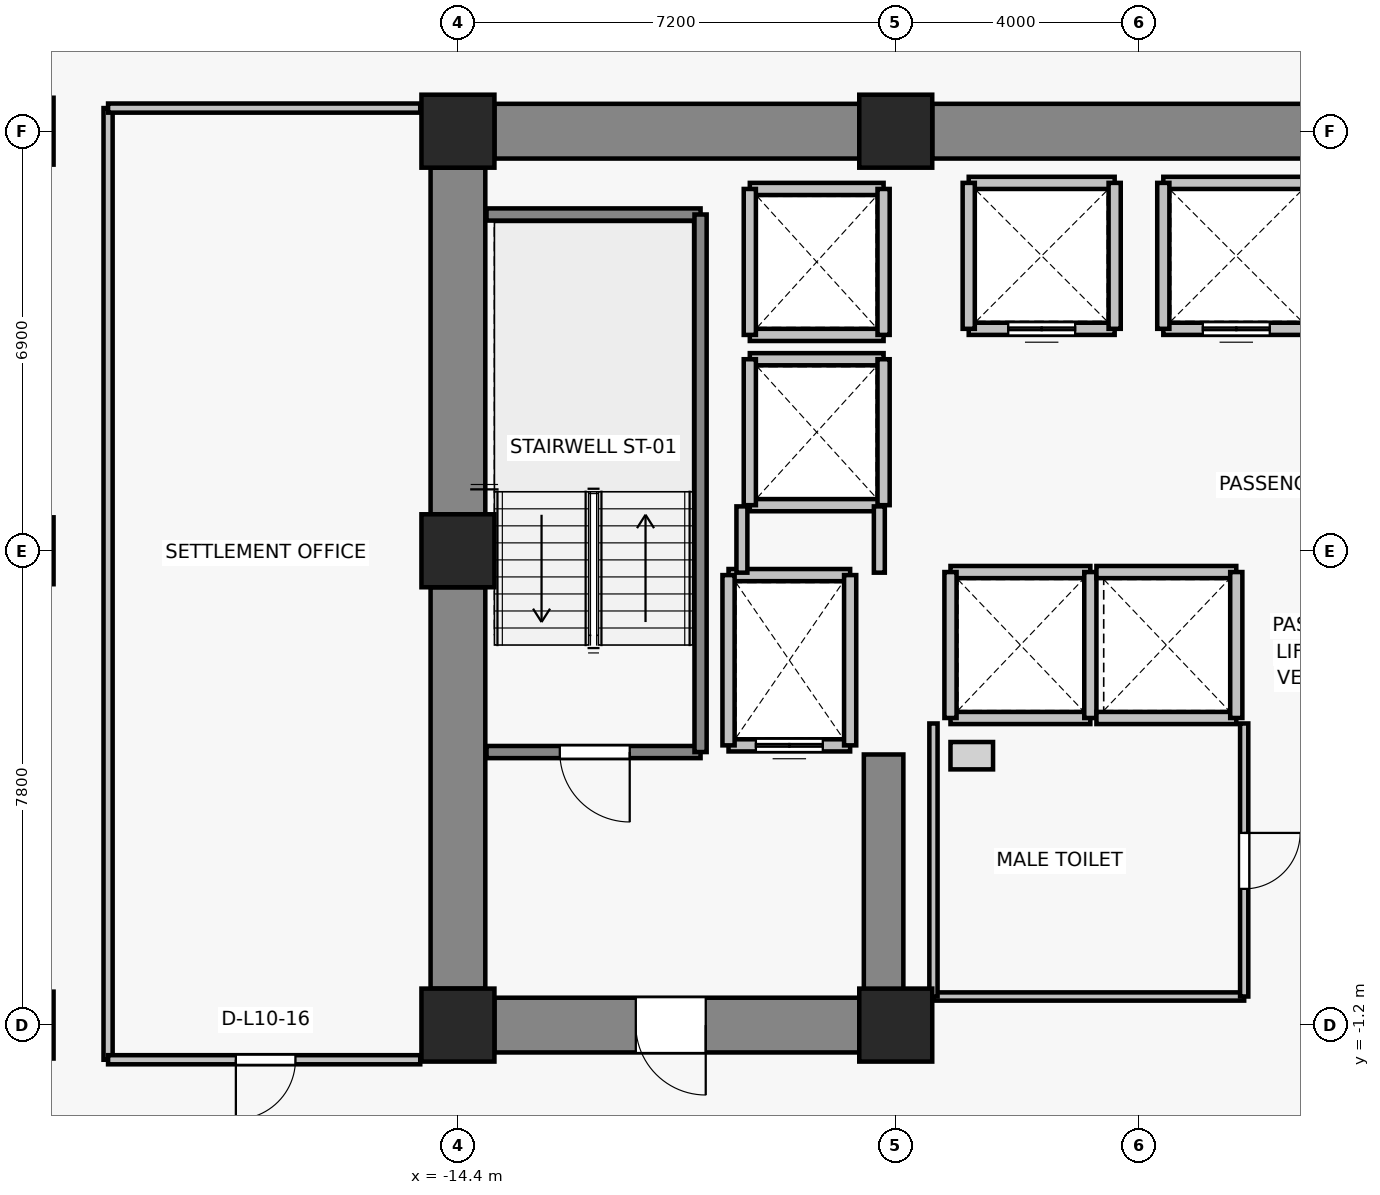
"""IFC4 building model, lengths in metres.
Left out: names, types, materials, properties, quantities, classifications, styles, units other than length and angle.
Written with IfcOpenShell. Run it as: python <this file> out.ifc"""

import sys

from ifc_helpers import new_model, si_unit, direction, frame, frame_2d, origin, origin_2d, place, context, subcontext, project, spatial, rectangle, extrude, source, transform, mapped, element, fill, save


model = new_model("IFC4")
c1 = context("Model", 3, precision=1e-05, world=origin(), true_north=direction((0.0, 1.0)))
c2 = subcontext(c1, "Body", "Model", "MODEL_VIEW")
j1 = project(units=[si_unit("LENGTHUNIT", "METRE"), si_unit("PLANEANGLEUNIT", "RADIAN")], contexts=[c1])
p1 = place(None, origin())
s1 = spatial("IfcSite", under=j1, at=p1, CompositionType="ELEMENT")
p2 = place(p1, origin())
s2 = spatial("IfcBuilding", under=s1, at=p2, CompositionType="ELEMENT")
p3 = place(p2, frame((0.0, 0.0, 40.6)))
s3 = spatial("IfcBuildingStorey", under=s2, at=p3, CompositionType="ELEMENT", Elevation=40.6)
for number, where, z_axis, x_axis in (
    (1, (-14.4, -1.2, 0.0), (0.0, 0.0, 1.0), (1.0, 0.0, 0.0)),
    (2, (-7.2, -1.2, 0.0), (0.0, 0.0, 1.0), (1.0, 0.0, 0.0)),
    (3, (-14.4, 6.6, 0.0), (0.0, 0.0, 1.0), (1.0, 0.0, 0.0)),
    (4, (-14.4, 13.5, 0.0), (0.0, 0.0, 1.0), (1.0, 0.0, 0.0)),
    (5, (-7.2, 13.5, 0.0), (0.0, 0.0, 1.0), (1.0, 0.0, 0.0)),
):
    element("IfcColumn", number, at=place(p3, frame(where, z_axis=z_axis, x_axis=x_axis)), inside=s3, PredefinedType="COLUMN", context=c2, shape_type="SweptSolid", body=[
        extrude(rectangle(XDim=1.2, YDim=1.2, at=origin_2d()), origin(), (0.0, 0.0, 1.0), 3.3),
    ])
for number, where, z_axis, x_axis in (
    (6, (-21.6, -1.2, 0.0), (0.0, 0.0, 1.0), (1.0, 0.0, 0.0)),
    (7, (-21.6, 6.6, 0.0), (0.0, 0.0, 1.0), (1.0, 0.0, 0.0)),
    (8, (-21.6, 13.5, 0.0), (0.0, 0.0, 1.0), (1.0, 0.0, 0.0)),
):
    element("IfcColumn", number, at=place(p3, frame(where, z_axis=z_axis, x_axis=x_axis)), inside=s3, PredefinedType="COLUMN", context=c2, shape_type="SweptSolid", body=[
        extrude(rectangle(XDim=1.1, YDim=1.1, at=origin_2d()), origin(), (0.0, 0.0, 1.0), 3.3),
    ])
p4 = place(p3, frame((-13.8, 13.5, 0.0), z_axis=(0.0, 0.0, 1.0), x_axis=(1.0, 0.0, 0.0)))
e9 = element("IfcWall", 9, at=p4, inside=s3, PredefinedType="SHEAR", context=c2, shape_type="SweptSolid", body=[
    extrude(rectangle(XDim=6.0, YDim=0.9, at=frame_2d((3.0, 0.0))), origin(), (0.0, 0.0, 1.0), 3.075),
])
p5 = place(p3, frame((-6.6, 13.5, 0.0), z_axis=(0.0, 0.0, 1.0), x_axis=(1.0, 0.0, 0.0)))
e10 = element("IfcWall", 10, at=p5, inside=s3, PredefinedType="SHEAR", context=c2, shape_type="SweptSolid", body=[
    extrude(rectangle(XDim=13.2, YDim=0.9, at=frame_2d((6.6, 0.0))), origin(), (0.0, 0.0, 1.0), 3.075),
])
p6 = place(p3, frame((-14.4, -0.6, 0.0), z_axis=(0.0, 0.0, 1.0), x_axis=(0.0, 1.0, 0.0)))
e11 = element("IfcWall", 11, at=p6, inside=s3, PredefinedType="SHEAR", context=c2, shape_type="SweptSolid", body=[
    extrude(rectangle(XDim=6.6, YDim=0.9, at=frame_2d((3.3, 0.0))), origin(), (0.0, 0.0, 1.0), 3.075),
])
p7 = place(p3, frame((-14.4, 7.2, 0.0), z_axis=(0.0, 0.0, 1.0), x_axis=(0.0, 1.0, 0.0)))
e12 = element("IfcWall", 12, at=p7, inside=s3, PredefinedType="SHEAR", context=c2, shape_type="SweptSolid", body=[
    extrude(rectangle(XDim=5.7, YDim=0.9, at=frame_2d((2.85, 0.0))), origin(), (0.0, 0.0, 1.0), 3.075),
])
p8 = place(p3, frame((-7.8, -1.2, 0.0), z_axis=(0.0, 0.0, 1.0), x_axis=(-1.0, 0.0, 0.0)))
e13 = element("IfcWall", 13, at=p8, inside=s3, PredefinedType="SHEAR", context=c2, shape_type="SweptSolid", body=[
    extrude(rectangle(XDim=6.0, YDim=0.9, at=frame_2d((3.0, 0.0))), origin(), (0.0, 0.0, 1.0), 3.075),
])
p9 = place(p8, frame((2.525, 0.0, 0.0)))
e14 = element("IfcOpeningElement", 14, at=p9, cuts=e13, PredefinedType="OPENING", context=c2, shape_type="SweptSolid", body=[
    extrude(rectangle(XDim=1.15, YDim=2.15, at=frame_2d((0.575, 1.075))), frame((0.0, 0.46, 0.0), z_axis=(0.0, -1.0, 0.0), x_axis=(1.0, 0.0, 0.0)), (0.0, 0.0, 1.0), 0.92),
])
p10 = place(p3, frame((-7.4, -0.75, 0.0), z_axis=(0.0, 0.0, 1.0), x_axis=(0.0, 1.0, 0.0)))
e15 = element("IfcWall", 15, at=p10, inside=s3, PredefinedType="SHEAR", context=c2, shape_type="SweptSolid", body=[
    extrude(rectangle(XDim=4.0, YDim=0.65, at=frame_2d((2.0, 0.0))), origin(), (0.0, 0.0, 1.0), 3.075),
])
p11 = place(p3, frame((-7.95, 3.4, 0.0), z_axis=(0.0, 0.0, 1.0), x_axis=(-1.0, 0.0, 0.0)))
e16 = element("IfcWall", 16, at=p11, inside=s3, PredefinedType="SOLIDWALL", context=c2, shape_type="SweptSolid", body=[
    extrude(rectangle(XDim=2.0, YDim=0.2, at=frame_2d((1.0, 0.0))), origin(), (0.0, 0.0, 1.0), 3.075),
])
p12 = place(p11, frame((0.45, 0.0, 0.0)))
e17 = element("IfcOpeningElement", 17, at=p12, cuts=e16, PredefinedType="OPENING", context=c2, shape_type="SweptSolid", body=[
    extrude(rectangle(XDim=1.1, YDim=2.2, at=frame_2d((0.55, 1.1))), frame((0.0, 0.11, 0.0), z_axis=(0.0, -1.0, 0.0), x_axis=(1.0, 0.0, 0.0)), (0.0, 0.0, 1.0), 0.22),
])
p13 = place(p3, frame((-9.95, 6.2, 0.0), z_axis=(0.0, 0.0, 1.0), x_axis=(1.0, 0.0, 0.0)))
e18 = element("IfcWall", 18, at=p13, inside=s3, PredefinedType="SOLIDWALL", context=c2, shape_type="SweptSolid", body=[
    extrude(rectangle(XDim=2.0, YDim=0.2, at=frame_2d((1.0, 0.0))), origin(), (0.0, 0.0, 1.0), 3.075),
])
for number, where, z_axis, x_axis in (
    (19, (-9.95, 3.4, 0.0), (0.0, 0.0, 1.0), (0.0, 1.0, 0.0)),
    (20, (-7.95, 6.2, 0.0), (0.0, 0.0, 1.0), (0.0, -1.0, 0.0)),
):
    element("IfcWall", number, at=place(p3, frame(where, z_axis=z_axis, x_axis=x_axis)), inside=s3, PredefinedType="SOLIDWALL", context=c2, shape_type="SweptSolid", body=[
        extrude(rectangle(XDim=2.8, YDim=0.2, at=frame_2d((1.4, 0.0))), origin(), (0.0, 0.0, 1.0), 3.075),
    ])
p14 = place(p3, frame((-3.6, 10.25, 0.0), z_axis=(0.0, 0.0, 1.0), x_axis=(-1.0, 0.0, 0.0)))
e21 = element("IfcWall", 21, at=p14, inside=s3, PredefinedType="SOLIDWALL", context=c2, shape_type="SweptSolid", body=[
    extrude(rectangle(XDim=2.4, YDim=0.2, at=frame_2d((1.2, 0.0))), origin(), (0.0, 0.0, 1.0), 3.075),
])
p15 = place(p14, frame((0.65, 0.0, 0.0)))
e22 = element("IfcOpeningElement", 22, at=p15, cuts=e21, PredefinedType="OPENING", context=c2, shape_type="SweptSolid", body=[
    extrude(rectangle(XDim=1.1, YDim=2.2, at=frame_2d((0.55, 1.1))), frame((0.0, 0.11, 0.0), z_axis=(0.0, -1.0, 0.0), x_axis=(1.0, 0.0, 0.0)), (0.0, 0.0, 1.0), 0.22),
])
for number, where, z_axis, x_axis in (
    (23, (-6.0, 12.65, 0.0), (0.0, 0.0, 1.0), (1.0, 0.0, 0.0)),
    (24, (-6.0, 10.25, 0.0), (0.0, 0.0, 1.0), (0.0, 1.0, 0.0)),
    (25, (-3.6, 12.65, 0.0), (0.0, 0.0, 1.0), (0.0, -1.0, 0.0)),
):
    element("IfcWall", number, at=place(p3, frame(where, z_axis=z_axis, x_axis=x_axis)), inside=s3, PredefinedType="SOLIDWALL", context=c2, shape_type="SweptSolid", body=[
        extrude(rectangle(XDim=2.4, YDim=0.2, at=frame_2d((1.2, 0.0))), origin(), (0.0, 0.0, 1.0), 3.075),
    ])
p16 = place(p3, frame((-0.4, 10.25, 0.0), z_axis=(0.0, 0.0, 1.0), x_axis=(-1.0, 0.0, 0.0)))
e26 = element("IfcWall", 26, at=p16, inside=s3, PredefinedType="SOLIDWALL", context=c2, shape_type="SweptSolid", body=[
    extrude(rectangle(XDim=2.4, YDim=0.2, at=frame_2d((1.2, 0.0))), origin(), (0.0, 0.0, 1.0), 3.075),
])
p17 = place(p16, frame((0.65, 0.0, 0.0)))
e27 = element("IfcOpeningElement", 27, at=p17, cuts=e26, PredefinedType="OPENING", context=c2, shape_type="SweptSolid", body=[
    extrude(rectangle(XDim=1.1, YDim=2.2, at=frame_2d((0.55, 1.1))), frame((0.0, 0.11, 0.0), z_axis=(0.0, -1.0, 0.0), x_axis=(1.0, 0.0, 0.0)), (0.0, 0.0, 1.0), 0.22),
])
p18 = place(p3, frame((-2.8, 12.65, 0.0), z_axis=(0.0, 0.0, 1.0), x_axis=(1.0, 0.0, 0.0)))
e28 = element("IfcWall", 28, at=p18, inside=s3, PredefinedType="SOLIDWALL", context=c2, shape_type="SweptSolid", body=[
    extrude(rectangle(XDim=2.4, YDim=0.2, at=frame_2d((1.2, 0.0))), origin(), (0.0, 0.0, 1.0), 3.075),
])
p19 = place(p3, frame((-2.8, 10.25, 0.0), z_axis=(0.0, 0.0, 1.0), x_axis=(0.0, 1.0, 0.0)))
e29 = element("IfcWall", 29, at=p19, inside=s3, PredefinedType="SOLIDWALL", context=c2, shape_type="SweptSolid", body=[
    extrude(rectangle(XDim=2.4, YDim=0.2, at=frame_2d((1.2, 0.0))), origin(), (0.0, 0.0, 1.0), 3.075),
])
for number, where, z_axis, x_axis in (
    (30, (-4.0, 3.85, 0.0), (0.0, 0.0, 1.0), (-1.0, 0.0, 0.0)),
    (31, (-6.3, 6.25, 0.0), (0.0, 0.0, 1.0), (1.0, 0.0, 0.0)),
):
    element("IfcWall", number, at=place(p3, frame(where, z_axis=z_axis, x_axis=x_axis)), inside=s3, PredefinedType="SOLIDWALL", context=c2, shape_type="SweptSolid", body=[
        extrude(rectangle(XDim=2.3, YDim=0.2, at=frame_2d((1.15, 0.0))), origin(), (0.0, 0.0, 1.0), 3.075),
    ])
for number, where, z_axis, x_axis in (
    (32, (-6.3, 3.85, 0.0), (0.0, 0.0, 1.0), (0.0, 1.0, 0.0)),
    (33, (-4.0, 6.25, 0.0), (0.0, 0.0, 1.0), (0.0, -1.0, 0.0)),
):
    element("IfcWall", number, at=place(p3, frame(where, z_axis=z_axis, x_axis=x_axis)), inside=s3, PredefinedType="SOLIDWALL", context=c2, shape_type="SweptSolid", body=[
        extrude(rectangle(XDim=2.4, YDim=0.2, at=frame_2d((1.2, 0.0))), origin(), (0.0, 0.0, 1.0), 3.075),
    ])
for number, where, z_axis, x_axis in (
    (34, (-1.6, 3.85, 0.0), (0.0, 0.0, 1.0), (-1.0, 0.0, 0.0)),
    (35, (-3.9, 6.25, 0.0), (0.0, 0.0, 1.0), (1.0, 0.0, 0.0)),
):
    element("IfcWall", number, at=place(p3, frame(where, z_axis=z_axis, x_axis=x_axis)), inside=s3, PredefinedType="SOLIDWALL", context=c2, shape_type="SweptSolid", body=[
        extrude(rectangle(XDim=2.3, YDim=0.2, at=frame_2d((1.15, 0.0))), origin(), (0.0, 0.0, 1.0), 3.075),
    ])
p20 = place(p3, frame((-1.6, 6.25, 0.0), z_axis=(0.0, 0.0, 1.0), x_axis=(0.0, -1.0, 0.0)))
e36 = element("IfcWall", 36, at=p20, inside=s3, PredefinedType="SOLIDWALL", context=c2, shape_type="SweptSolid", body=[
    extrude(rectangle(XDim=2.4, YDim=0.2, at=frame_2d((1.2, 0.0))), origin(), (0.0, 0.0, 1.0), 3.075),
])
for number, where, z_axis, x_axis in (
    (37, (-7.4, 7.35, 0.0), (0.0, 0.0, 1.0), (-1.0, 0.0, 0.0)),
    (38, (-9.6, 9.75, 0.0), (0.0, 0.0, 1.0), (1.0, 0.0, 0.0)),
):
    element("IfcWall", number, at=place(p3, frame(where, z_axis=z_axis, x_axis=x_axis)), inside=s3, PredefinedType="SOLIDWALL", context=c2, shape_type="SweptSolid", body=[
        extrude(rectangle(XDim=2.2, YDim=0.2, at=frame_2d((1.1, 0.0))), origin(), (0.0, 0.0, 1.0), 2.465),
    ])
p21 = place(p3, frame((-9.6, 7.35, 0.0), z_axis=(0.0, 0.0, 1.0), x_axis=(0.0, 1.0, 0.0)))
e39 = element("IfcWall", 39, at=p21, inside=s3, PredefinedType="SOLIDWALL", context=c2, shape_type="SweptSolid", body=[
    extrude(rectangle(XDim=2.4, YDim=0.2, at=frame_2d((1.2, 0.0))), origin(), (0.0, 0.0, 1.0), 3.075),
])
p22 = place(p3, frame((-7.4, 9.75, 0.0), z_axis=(0.0, 0.0, 1.0), x_axis=(0.0, -1.0, 0.0)))
e40 = element("IfcWall", 40, at=p22, inside=s3, PredefinedType="SOLIDWALL", context=c2, shape_type="SweptSolid", body=[
    extrude(rectangle(XDim=2.4, YDim=0.2, at=frame_2d((1.2, 0.0))), origin(), (0.0, 0.0, 1.0), 2.465),
])
for number, where, z_axis, x_axis in (
    (41, (-7.4, 10.15, 0.0), (0.0, 0.0, 1.0), (-1.0, 0.0, 0.0)),
    (42, (-9.6, 12.55, 0.0), (0.0, 0.0, 1.0), (1.0, 0.0, 0.0)),
):
    element("IfcWall", number, at=place(p3, frame(where, z_axis=z_axis, x_axis=x_axis)), inside=s3, PredefinedType="SOLIDWALL", context=c2, shape_type="SweptSolid", body=[
        extrude(rectangle(XDim=2.2, YDim=0.2, at=frame_2d((1.1, 0.0))), origin(), (0.0, 0.0, 1.0), 2.465),
    ])
p23 = place(p3, frame((-9.6, 10.15, 0.0), z_axis=(0.0, 0.0, 1.0), x_axis=(0.0, 1.0, 0.0)))
e43 = element("IfcWall", 43, at=p23, inside=s3, PredefinedType="SOLIDWALL", context=c2, shape_type="SweptSolid", body=[
    extrude(rectangle(XDim=2.4, YDim=0.2, at=frame_2d((1.2, 0.0))), origin(), (0.0, 0.0, 1.0), 3.075),
])
p24 = place(p3, frame((-7.4, 12.55, 0.0), z_axis=(0.0, 0.0, 1.0), x_axis=(0.0, -1.0, 0.0)))
e44 = element("IfcWall", 44, at=p24, inside=s3, PredefinedType="SOLIDWALL", context=c2, shape_type="SweptSolid", body=[
    extrude(rectangle(XDim=2.4, YDim=0.2, at=frame_2d((1.2, 0.0))), origin(), (0.0, 0.0, 1.0), 2.465),
])
p25 = place(p3, frame((-10.41, 3.29, 0.0), z_axis=(0.0, 0.0, 1.0), x_axis=(-1.0, 0.0, 0.0)))
e45 = element("IfcWall", 45, at=p25, inside=s3, PredefinedType="SOLIDWALL", context=c2, shape_type="SweptSolid", body=[
    extrude(rectangle(XDim=3.52, YDim=0.2, at=frame_2d((1.76, 0.0))), origin(), (0.0, 0.0, 1.0), 3.075),
])
p26 = place(p25, frame((1.165, 0.0, 0.0)))
e46 = element("IfcOpeningElement", 46, at=p26, cuts=e45, PredefinedType="OPENING", context=c2, shape_type="SweptSolid", body=[
    extrude(rectangle(XDim=1.15, YDim=2.15, at=frame_2d((0.575, 1.075))), frame((0.0, 0.11, 0.0), z_axis=(0.0, -1.0, 0.0), x_axis=(1.0, 0.0, 0.0)), (0.0, 0.0, 1.0), 0.22),
])
p27 = place(p3, frame((-13.93, 12.13, 0.0), z_axis=(0.0, 0.0, 1.0), x_axis=(1.0, 0.0, 0.0)))
e47 = element("IfcWall", 47, at=p27, inside=s3, PredefinedType="SOLIDWALL", context=c2, shape_type="SweptSolid", body=[
    extrude(rectangle(XDim=3.52, YDim=0.2, at=frame_2d((1.76, 0.0))), origin(), (0.0, 0.0, 1.0), 3.075),
])
p28 = place(p3, frame((-10.41, 12.13, 0.0), z_axis=(0.0, 0.0, 1.0), x_axis=(0.0, -1.0, 0.0)))
e48 = element("IfcWall", 48, at=p28, inside=s3, PredefinedType="SOLIDWALL", context=c2, shape_type="SweptSolid", body=[
    extrude(rectangle(XDim=8.84, YDim=0.2, at=frame_2d((4.42, 0.0))), origin(), (0.0, 0.0, 1.0), 3.075),
])
p29 = place(p3, frame((-9.73, 6.24, 0.0), z_axis=(0.0, 0.0, 1.0), x_axis=(0.0, 1.0, 0.0)))
e49 = element("IfcWall", 49, at=p29, inside=s3, PredefinedType="PARTITIONING", context=c2, shape_type="SweptSolid", body=[
    extrude(rectangle(XDim=1.09, YDim=0.18, at=frame_2d((0.545, 0.0))), origin(), (0.0, 0.0, 1.0), 3.075),
])
p30 = place(p3, frame((-7.47, 7.33, 0.0), z_axis=(0.0, 0.0, 1.0), x_axis=(0.0, -1.0, 0.0)))
e50 = element("IfcWall", 50, at=p30, inside=s3, PredefinedType="PARTITIONING", context=c2, shape_type="SweptSolid", body=[
    extrude(rectangle(XDim=1.09, YDim=0.18, at=frame_2d((0.545, 0.0))), origin(), (0.0, 0.0, 1.0), 2.465),
])
p31 = place(p3, frame((-1.47, -0.73, 0.0), z_axis=(0.0, 0.0, 1.0), x_axis=(-1.0, 0.0, 0.0)))
e51 = element("IfcWall", 51, at=p31, inside=s3, PredefinedType="PARTITIONING", context=c2, shape_type="SweptSolid", body=[
    extrude(rectangle(XDim=5.11, YDim=0.135, at=frame_2d((2.555, 0.0))), origin(), (0.0, 0.0, 1.0), 3.075),
])
p32 = place(p3, frame((-6.58, -0.73, 0.0), z_axis=(0.0, 0.0, 1.0), x_axis=(0.0, 1.0, 0.0)))
e52 = element("IfcWall", 52, at=p32, inside=s3, PredefinedType="PARTITIONING", context=c2, shape_type="SweptSolid", body=[
    extrude(rectangle(XDim=4.49, YDim=0.135, at=frame_2d((2.245, 0.0))), origin(), (0.0, 0.0, 1.0), 3.075),
])
p33 = place(p3, frame((-1.47, 3.76, 0.0), z_axis=(0.0, 0.0, 1.0), x_axis=(0.0, -1.0, 0.0)))
e53 = element("IfcWall", 53, at=p33, inside=s3, PredefinedType="PARTITIONING", context=c2, shape_type="SweptSolid", body=[
    extrude(rectangle(XDim=4.49, YDim=0.135, at=frame_2d((2.245, 0.0))), origin(), (0.0, 0.0, 1.0), 3.075),
])
p34 = place(p33, frame((1.8, 0.0, 0.0)))
e54 = element("IfcOpeningElement", 54, at=p34, cuts=e53, PredefinedType="OPENING", context=c2, shape_type="SweptSolid", body=[
    extrude(rectangle(XDim=0.92, YDim=2.1, at=frame_2d((0.46, 1.05))), frame((0.0, 0.077, 0.0), z_axis=(0.0, -1.0, 0.0), x_axis=(1.0, 0.0, 0.0)), (0.0, 0.0, 1.0), 0.155),
])
p35 = place(p3, frame((-20.154, 13.88, 0.0), z_axis=(0.0, 0.0, 1.0), x_axis=(0.0, -1.0, 0.0)))
e55 = element("IfcWall", 55, at=p35, inside=s3, PredefinedType="PARTITIONING", context=c2, shape_type="SweptSolid", body=[
    extrude(rectangle(XDim=15.65, YDim=0.15, at=frame_2d((7.825, 0.0))), origin(), (0.0, 0.0, 1.0), 2.465),
])
p36 = place(p3, frame((-15.02, -1.77, 0.0), z_axis=(0.0, 0.0, 1.0), x_axis=(-1.0, 0.0, 0.0)))
e56 = element("IfcWall", 56, at=p36, inside=s3, PredefinedType="PARTITIONING", context=c2, shape_type="SweptSolid", body=[
    extrude(rectangle(XDim=5.134, YDim=0.15, at=frame_2d((2.567, 0.0))), origin(), (0.0, 0.0, 1.0), 3.075),
])
p37 = place(p36, frame((2.052, 0.0, 0.0)))
e57 = element("IfcOpeningElement", 57, at=p37, cuts=e56, PredefinedType="OPENING", context=c2, shape_type="SweptSolid", body=[
    extrude(rectangle(XDim=0.98, YDim=2.15, at=frame_2d((0.49, 1.075))), frame((0.0, 0.085, 0.0), z_axis=(0.0, -1.0, 0.0), x_axis=(1.0, 0.0, 0.0)), (0.0, 0.0, 1.0), 0.17),
])
p38 = place(p3, frame((-20.154, 13.88, 0.0), z_axis=(0.0, 0.0, 1.0), x_axis=(1.0, 0.0, 0.0)))
e58 = element("IfcWall", 58, at=p38, inside=s3, PredefinedType="PARTITIONING", context=c2, shape_type="SweptSolid", body=[
    extrude(rectangle(XDim=5.134, YDim=0.15, at=frame_2d((2.567, 0.0))), origin(), (0.0, 0.0, 1.0), 3.075),
])
m1 = source(origin(), c2, "Body", "SweptSolid", [
    extrude(rectangle(XDim=1.1, YDim=2.2, at=frame_2d((0.55, 1.1))), frame((0.0, 0.025, 0.0), z_axis=(0.0, -1.0, 0.0), x_axis=(1.0, 0.0, 0.0)), (0.0, 0.0, 1.0), 0.05),
])
p39 = place(p12, origin())
e59 = element("IfcDoor", 59, at=p39, inside=s3, OperationType="DOUBLE_DOOR_SLIDING", PredefinedType="DOOR", context=c2, shape_type="MappedRepresentation", body=[
    mapped(m1, transform((0.0, 0.0, 0.0), x_axis=(1.0, 0.0, 0.0), y_axis=(0.0, 1.0, 0.0), z_axis=(0.0, 0.0, 1.0), scale=1.0)),
])
fill(e17, e59)
p40 = place(p15, origin())
e60 = element("IfcDoor", 60, at=p40, inside=s3, OperationType="DOUBLE_DOOR_SLIDING", PredefinedType="DOOR", context=c2, shape_type="MappedRepresentation", body=[
    mapped(m1, transform((0.0, 0.0, 0.0), x_axis=(1.0, 0.0, 0.0), y_axis=(0.0, 1.0, 0.0), z_axis=(0.0, 0.0, 1.0), scale=1.0)),
])
fill(e22, e60)
p41 = place(p17, origin())
e61 = element("IfcDoor", 61, at=p41, inside=s3, OperationType="DOUBLE_DOOR_SLIDING", PredefinedType="DOOR", context=c2, shape_type="MappedRepresentation", body=[
    mapped(m1, transform((0.0, 0.0, 0.0), x_axis=(1.0, 0.0, 0.0), y_axis=(0.0, 1.0, 0.0), z_axis=(0.0, 0.0, 1.0), scale=1.0)),
])
fill(e27, e61)
m2 = source(origin(), c2, "Body", "SweptSolid", [
    extrude(rectangle(XDim=1.15, YDim=2.15, at=frame_2d((0.575, 1.075))), frame((0.0, 0.025, 0.0), z_axis=(0.0, -1.0, 0.0), x_axis=(1.0, 0.0, 0.0)), (0.0, 0.0, 1.0), 0.05),
])
p42 = place(p26, origin())
e62 = element("IfcDoor", 62, at=p42, inside=s3, OperationType="SINGLE_SWING_LEFT", PredefinedType="DOOR", context=c2, shape_type="MappedRepresentation", body=[
    mapped(m2, transform((0.0, 0.0, 0.0), x_axis=(1.0, 0.0, 0.0), y_axis=(0.0, 1.0, 0.0), z_axis=(0.0, 0.0, 1.0), scale=1.0)),
])
fill(e46, e62)
p43 = place(p9, origin())
e63 = element("IfcDoor", 63, at=p43, inside=s3, OperationType="SINGLE_SWING_LEFT", PredefinedType="DOOR", context=c2, shape_type="MappedRepresentation", body=[
    mapped(m2, transform((0.0, 0.0, 0.0), x_axis=(1.0, 0.0, 0.0), y_axis=(0.0, 1.0, 0.0), z_axis=(0.0, 0.0, 1.0), scale=1.0)),
])
fill(e14, e63)
m3 = source(origin(), c2, "Body", "SweptSolid", [
    extrude(rectangle(XDim=0.92, YDim=2.1, at=frame_2d((0.46, 1.05))), frame((0.0, 0.025, 0.0), z_axis=(0.0, -1.0, 0.0), x_axis=(1.0, 0.0, 0.0)), (0.0, 0.0, 1.0), 0.05),
])
p44 = place(p34, origin())
e64 = element("IfcDoor", 64, at=p44, inside=s3, OperationType="SINGLE_SWING_LEFT", PredefinedType="DOOR", context=c2, shape_type="MappedRepresentation", body=[
    mapped(m3, transform((0.0, 0.0, 0.0), x_axis=(1.0, 0.0, 0.0), y_axis=(0.0, 1.0, 0.0), z_axis=(0.0, 0.0, 1.0), scale=1.0)),
])
fill(e54, e64)
m4 = source(origin(), c2, "Body", "SweptSolid", [
    extrude(rectangle(XDim=0.98, YDim=2.15, at=frame_2d((0.49, 1.075))), frame((0.0, 0.025, 0.0), z_axis=(0.0, -1.0, 0.0), x_axis=(1.0, 0.0, 0.0)), (0.0, 0.0, 1.0), 0.05),
])
p45 = place(p37, origin())
e65 = element("IfcDoor", 65, at=p45, inside=s3, OperationType="SINGLE_SWING_RIGHT", PredefinedType="DOOR", context=c2, shape_type="MappedRepresentation", body=[
    mapped(m4, transform((0.0, 0.0, 0.0), x_axis=(1.0, 0.0, 0.0), y_axis=(0.0, 1.0, 0.0), z_axis=(0.0, 0.0, 1.0), scale=1.0)),
])
fill(e57, e65)
save(model, sys.argv[1])
